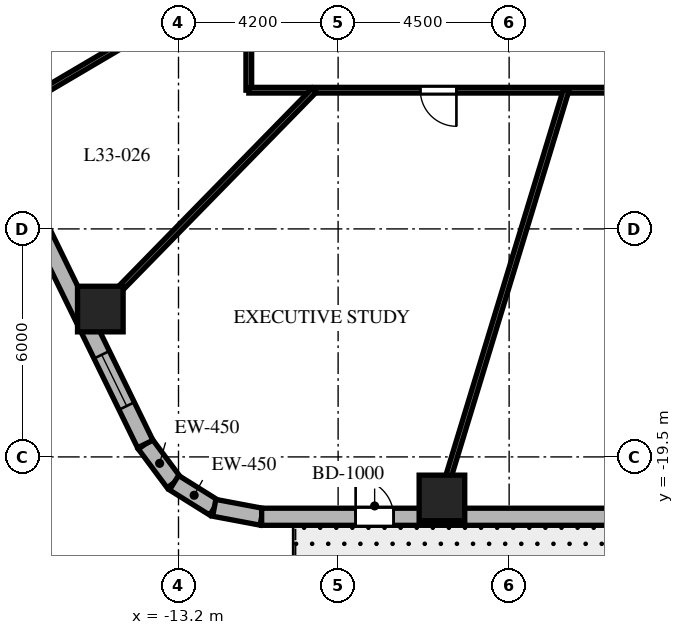
"""IFC4 building model, lengths in metres.
Left out: names, types, materials, properties, quantities, classifications, styles, units other than length and angle.
Written with IfcOpenShell. Run it as: python <this file> out.ifc"""

import sys

from ifc_helpers import new_model, si_unit, direction, frame, frame_2d, origin, origin_2d, place, context, subcontext, project, spatial, rectangle, extrude, element, fill, save


model = new_model("IFC4")
c1 = context("Model", 3, precision=1e-05, world=origin(), true_north=direction((0.0, 1.0)))
c2 = subcontext(c1, "Body", "Model", "MODEL_VIEW")
j1 = project(units=[si_unit("LENGTHUNIT", "METRE"), si_unit("PLANEANGLEUNIT", "RADIAN")], contexts=[c1])
p1 = place(None, origin())
s1 = spatial("IfcSite", under=j1, at=p1, CompositionType="ELEMENT")
p2 = place(p1, origin())
s2 = spatial("IfcBuilding", under=s1, at=p2, CompositionType="ELEMENT")
p3 = place(p2, frame((0.0, 0.0, 135.8)))
s3 = spatial("IfcBuildingStorey", under=s2, at=p3, CompositionType="ELEMENT", Elevation=135.8)
for number, where, z_axis, x_axis in (
    (1, (-6.268, -20.58, 0.0), (0.0, 0.0, 1.0), (1.0, 0.0, 0.0)),
    (2, (-15.257, -15.609, 0.0), (0.0, 0.0, 1.0), (1.0, 0.0, 0.0)),
):
    element("IfcColumn", number, at=place(p3, frame(where, z_axis=z_axis, x_axis=x_axis)), inside=s3, PredefinedType="COLUMN", context=c2, shape_type="SweptSolid", body=[
        extrude(rectangle(XDim=1.2, YDim=1.2, at=origin_2d()), origin(), (0.0, 0.0, 1.0), 3.7),
    ])
p4 = place(p3, frame((-14.076, -19.161, 0.0), z_axis=(0.0, 0.0, 1.0), x_axis=(0.597226657159, -0.802072515412, 0.0)))
e3 = element("IfcWall", 3, at=p4, inside=s3, PredefinedType="SOLIDWALL", context=c2, shape_type="SweptSolid", body=[
    extrude(rectangle(XDim=1.269, YDim=0.45, at=frame_2d((0.635, 0.0))), origin(), (0.0, 0.0, 1.0), 3.38),
])
p5 = place(p3, frame((-13.318, -20.179, 0.0), z_axis=(0.0, 0.0, 1.0), x_axis=(0.848031272749, -0.529946186362, 0.0)))
e4 = element("IfcWall", 4, at=p5, inside=s3, PredefinedType="SOLIDWALL", context=c2, shape_type="SweptSolid", body=[
    extrude(rectangle(XDim=1.248, YDim=0.45, at=frame_2d((0.624, 0.0))), origin(), (0.0, 0.0, 1.0), 3.38),
])
p6 = place(p3, frame((-12.259, -20.84, 0.0), z_axis=(0.0, 0.0, 1.0), x_axis=(0.982730354425, -0.185043374624, 0.0)))
e5 = element("IfcWall", 5, at=p6, inside=s3, PredefinedType="SOLIDWALL", context=c2, shape_type="SweptSolid", body=[
    extrude(rectangle(XDim=1.269, YDim=0.45, at=frame_2d((0.635, 0.0))), origin(), (0.0, 0.0, 1.0), 3.38),
])
p7 = place(p3, frame((-11.012, -21.075, 0.0), z_axis=(0.0, 0.0, 1.0), x_axis=(1.0, 0.0, 0.0)))
e6 = element("IfcWall", 6, at=p7, inside=s3, PredefinedType="SOLIDWALL", context=c2, shape_type="SweptSolid", body=[
    extrude(rectangle(XDim=23.782, YDim=0.45, at=frame_2d((11.891, 0.0))), origin(), (0.0, 0.0, 1.0), 3.38),
])
p8 = place(p7, frame((2.473, 0.0, 0.0)))
e7 = element("IfcOpeningElement", 7, at=p8, cuts=e6, PredefinedType="OPENING", context=c2, shape_type="SweptSolid", body=[
    extrude(rectangle(XDim=1.0, YDim=2.15, at=frame_2d((0.5, 1.075))), frame((0.0, 0.235, 0.0), z_axis=(0.0, -1.0, 0.0), x_axis=(1.0, 0.0, 0.0)), (0.0, 0.0, 1.0), 0.47),
])
p9 = place(p7, frame((11.142, 0.0, 0.8)))
e8 = element("IfcOpeningElement", 8, at=p9, cuts=e6, PredefinedType="OPENING", context=c2, shape_type="SweptSolid", body=[
    extrude(rectangle(XDim=1.5, YDim=1.8, at=frame_2d((0.75, 0.9))), frame((0.0, 0.235, 0.0), z_axis=(0.0, -1.0, 0.0), x_axis=(1.0, 0.0, 0.0)), (0.0, 0.0, 1.0), 0.47),
])
p10 = place(p7, frame((20.741, 0.0, 0.8)))
e9 = element("IfcOpeningElement", 9, at=p10, cuts=e6, PredefinedType="OPENING", context=c2, shape_type="SweptSolid", body=[
    extrude(rectangle(XDim=1.5, YDim=1.8, at=frame_2d((0.75, 0.9))), frame((0.0, 0.235, 0.0), z_axis=(0.0, -1.0, 0.0), x_axis=(1.0, 0.0, 0.0)), (0.0, 0.0, 1.0), 0.47),
])
p11 = place(p3, frame((-22.238, -2.427, 0.0), z_axis=(0.0, 0.0, 1.0), x_axis=(0.438374803278, -0.898792262901, 0.0)))
e10 = element("IfcWall", 10, at=p11, inside=s3, PredefinedType="SOLIDWALL", context=c2, shape_type="SweptSolid", body=[
    extrude(rectangle(XDim=18.618, YDim=0.45, at=frame_2d((9.309, 0.0))), origin(), (0.0, 0.0, 1.0), 3.38),
])
p12 = place(p11, frame((1.163, 0.0, 0.8)))
e11 = element("IfcOpeningElement", 11, at=p12, cuts=e10, PredefinedType="OPENING", context=c2, shape_type="SweptSolid", body=[
    extrude(rectangle(XDim=1.5, YDim=1.8, at=frame_2d((0.75, 0.9))), frame((0.0, 0.235, 0.0), z_axis=(0.0, -1.0, 0.0), x_axis=(1.0, 0.0, 0.0)), (0.0, 0.0, 1.0), 0.47),
])
p13 = place(p11, frame((5.926, 0.0, 0.8)))
e12 = element("IfcOpeningElement", 12, at=p13, cuts=e10, PredefinedType="OPENING", context=c2, shape_type="SweptSolid", body=[
    extrude(rectangle(XDim=1.5, YDim=1.8, at=frame_2d((0.75, 0.9))), frame((0.0, 0.235, 0.0), z_axis=(0.0, -1.0, 0.0), x_axis=(1.0, 0.0, 0.0)), (0.0, 0.0, 1.0), 0.47),
])
p14 = place(p11, frame((11.165, 0.0, 0.8)))
e13 = element("IfcOpeningElement", 13, at=p14, cuts=e10, PredefinedType="OPENING", context=c2, shape_type="SweptSolid", body=[
    extrude(rectangle(XDim=1.5, YDim=1.8, at=frame_2d((0.75, 0.9))), frame((0.0, 0.235, 0.0), z_axis=(0.0, -1.0, 0.0), x_axis=(1.0, 0.0, 0.0)), (0.0, 0.0, 1.0), 0.47),
])
p15 = place(p11, frame((16.006, 0.0, 0.8)))
e14 = element("IfcOpeningElement", 14, at=p15, cuts=e10, PredefinedType="OPENING", context=c2, shape_type="SweptSolid", body=[
    extrude(rectangle(XDim=1.5, YDim=1.8, at=frame_2d((0.75, 0.9))), frame((0.0, 0.235, 0.0), z_axis=(0.0, -1.0, 0.0), x_axis=(1.0, 0.0, 0.0)), (0.0, 0.0, 1.0), 0.47),
])
p16 = place(p3, frame((-11.35, -9.85, 0.0), z_axis=(0.0, 0.0, 1.0), x_axis=(0.0, 1.0, 0.0)))
e15 = element("IfcWall", 15, at=p16, inside=s3, PredefinedType="PARTITIONING", context=c2, shape_type="SweptSolid", body=[
    extrude(rectangle(XDim=19.7, YDim=0.15, at=frame_2d((9.85, 0.0))), origin(), (0.0, 0.0, 1.0), 2.82),
])
p17 = place(p16, frame((16.711, 0.0, 0.0)))
e16 = element("IfcOpeningElement", 16, at=p17, cuts=e15, PredefinedType="OPENING", context=c2, shape_type="SweptSolid", body=[
    extrude(rectangle(XDim=0.95, YDim=2.03, at=frame_2d((0.475, 1.015))), frame((0.0, 0.085, 0.0), z_axis=(0.0, -1.0, 0.0), x_axis=(1.0, 0.0, 0.0)), (0.0, 0.0, 1.0), 0.17),
])
p18 = place(p16, frame((12.968, 0.0, 0.0)))
e17 = element("IfcOpeningElement", 17, at=p18, cuts=e15, PredefinedType="OPENING", context=c2, shape_type="SweptSolid", body=[
    extrude(rectangle(XDim=0.9, YDim=2.03, at=frame_2d((0.45, 1.015))), frame((0.0, 0.085, 0.0), z_axis=(0.0, -1.0, 0.0), x_axis=(1.0, 0.0, 0.0)), (0.0, 0.0, 1.0), 0.17),
])
p19 = place(p16, frame((8.836, 0.0, 0.0)))
e18 = element("IfcOpeningElement", 18, at=p19, cuts=e15, PredefinedType="OPENING", context=c2, shape_type="SweptSolid", body=[
    extrude(rectangle(XDim=0.95, YDim=2.03, at=frame_2d((0.475, 1.015))), frame((0.0, 0.085, 0.0), z_axis=(0.0, -1.0, 0.0), x_axis=(1.0, 0.0, 0.0)), (0.0, 0.0, 1.0), 0.17),
])
p20 = place(p16, frame((4.448, 0.0, 0.0)))
e19 = element("IfcOpeningElement", 19, at=p20, cuts=e15, PredefinedType="OPENING", context=c2, shape_type="SweptSolid", body=[
    extrude(rectangle(XDim=0.95, YDim=2.03, at=frame_2d((0.475, 1.015))), frame((0.0, 0.085, 0.0), z_axis=(0.0, -1.0, 0.0), x_axis=(1.0, 0.0, 0.0)), (0.0, 0.0, 1.0), 0.17),
])
p21 = place(p16, frame((1.249, 0.0, 0.0)))
e20 = element("IfcOpeningElement", 20, at=p21, cuts=e15, PredefinedType="OPENING", context=c2, shape_type="SweptSolid", body=[
    extrude(rectangle(XDim=0.9, YDim=2.03, at=frame_2d((0.45, 1.015))), frame((0.0, 0.085, 0.0), z_axis=(0.0, -1.0, 0.0), x_axis=(1.0, 0.0, 0.0)), (0.0, 0.0, 1.0), 0.17),
])
p22 = place(p3, frame((11.35, -9.85, 0.0), z_axis=(0.0, 0.0, 1.0), x_axis=(-1.0, 0.0, 0.0)))
e21 = element("IfcWall", 21, at=p22, inside=s3, PredefinedType="PARTITIONING", context=c2, shape_type="SweptSolid", body=[
    extrude(rectangle(XDim=22.7, YDim=0.15, at=frame_2d((11.35, 0.0))), origin(), (0.0, 0.0, 1.0), 2.82),
])
p23 = place(p22, frame((17.237, 0.0, 0.0)))
e22 = element("IfcOpeningElement", 22, at=p23, cuts=e21, PredefinedType="OPENING", context=c2, shape_type="SweptSolid", body=[
    extrude(rectangle(XDim=0.95, YDim=2.03, at=frame_2d((0.475, 1.015))), frame((0.0, 0.085, 0.0), z_axis=(0.0, -1.0, 0.0), x_axis=(1.0, 0.0, 0.0)), (0.0, 0.0, 1.0), 0.17),
])
p24 = place(p22, frame((10.45, 0.0, 0.0)))
e23 = element("IfcOpeningElement", 23, at=p24, cuts=e21, PredefinedType="OPENING", context=c2, shape_type="SweptSolid", body=[
    extrude(rectangle(XDim=0.95, YDim=2.03, at=frame_2d((0.475, 1.015))), frame((0.0, 0.085, 0.0), z_axis=(0.0, -1.0, 0.0), x_axis=(1.0, 0.0, 0.0)), (0.0, 0.0, 1.0), 0.17),
])
p25 = place(p22, frame((3.399, 0.0, 0.0)))
e24 = element("IfcOpeningElement", 24, at=p25, cuts=e21, PredefinedType="OPENING", context=c2, shape_type="SweptSolid", body=[
    extrude(rectangle(XDim=0.95, YDim=2.03, at=frame_2d((0.475, 1.015))), frame((0.0, 0.085, 0.0), z_axis=(0.0, -1.0, 0.0), x_axis=(1.0, 0.0, 0.0)), (0.0, 0.0, 1.0), 0.17),
])
p26 = place(p3, frame((-11.35, -6.691, 0.0), z_axis=(0.0, 0.0, 1.0), x_axis=(-0.861446954497, -0.507847560383, 0.0)))
e25 = element("IfcWall", 25, at=p26, inside=s3, PredefinedType="PARTITIONING", context=c2, shape_type="SweptSolid", body=[
    extrude(rectangle(XDim=7.941, YDim=0.15, at=frame_2d((3.97, 0.0))), origin(), (0.0, 0.0, 1.0), 2.52),
])
p27 = place(p3, frame((-9.628, -9.85, 0.0), z_axis=(0.0, 0.0, 1.0), x_axis=(-0.698992824326, -0.715128681805, 0.0)))
e26 = element("IfcWall", 26, at=p27, inside=s3, PredefinedType="PARTITIONING", context=c2, shape_type="SweptSolid", body=[
    extrude(rectangle(XDim=8.579, YDim=0.15, at=frame_2d((4.29, 0.0))), origin(), (0.0, 0.0, 1.0), 2.52),
])
p28 = place(p3, frame((-3.0, -9.85, 0.0), z_axis=(0.0, 0.0, 1.0), x_axis=(-0.291352035382, -0.95661590593, 0.0)))
e27 = element("IfcWall", 27, at=p28, inside=s3, PredefinedType="PARTITIONING", context=c2, shape_type="SweptSolid", body=[
    extrude(rectangle(XDim=11.734, YDim=0.15, at=frame_2d((5.867, 0.0))), origin(), (0.0, 0.0, 1.0), 2.52),
])
p29 = place(p8, origin())
e28 = element("IfcDoor", 28, at=p29, inside=s3, OperationType="SINGLE_SWING_LEFT", PredefinedType="DOOR", context=c2, shape_type="SweptSolid", body=[
    extrude(rectangle(XDim=1.0, YDim=2.15, at=frame_2d((0.5, 1.075))), frame((0.0, 0.025, 0.0), z_axis=(0.0, -1.0, 0.0), x_axis=(1.0, 0.0, 0.0)), (0.0, 0.0, 1.0), 0.05),
])
fill(e7, e28)
p30 = place(p15, origin())
e29 = element("IfcWindow", 29, at=p30, inside=s3, PartitioningType="SINGLE_PANEL", PredefinedType="WINDOW", context=c2, shape_type="SweptSolid", body=[
    extrude(rectangle(XDim=1.5, YDim=1.8, at=frame_2d((0.75, 0.9))), frame((0.0, 0.03, 0.0), z_axis=(0.0, -1.0, 0.0), x_axis=(1.0, 0.0, 0.0)), (0.0, 0.0, 1.0), 0.06),
])
fill(e14, e29)
p31 = place(p23, origin())
e30 = element("IfcDoor", 30, at=p31, inside=s3, OperationType="SINGLE_SWING_LEFT", PredefinedType="DOOR", context=c2, shape_type="SweptSolid", body=[
    extrude(rectangle(XDim=0.95, YDim=2.03, at=frame_2d((0.475, 1.015))), frame((0.0, 0.025, 0.0), z_axis=(0.0, -1.0, 0.0), x_axis=(1.0, 0.0, 0.0)), (0.0, 0.0, 1.0), 0.05),
])
fill(e22, e30)
save(model, sys.argv[1])
